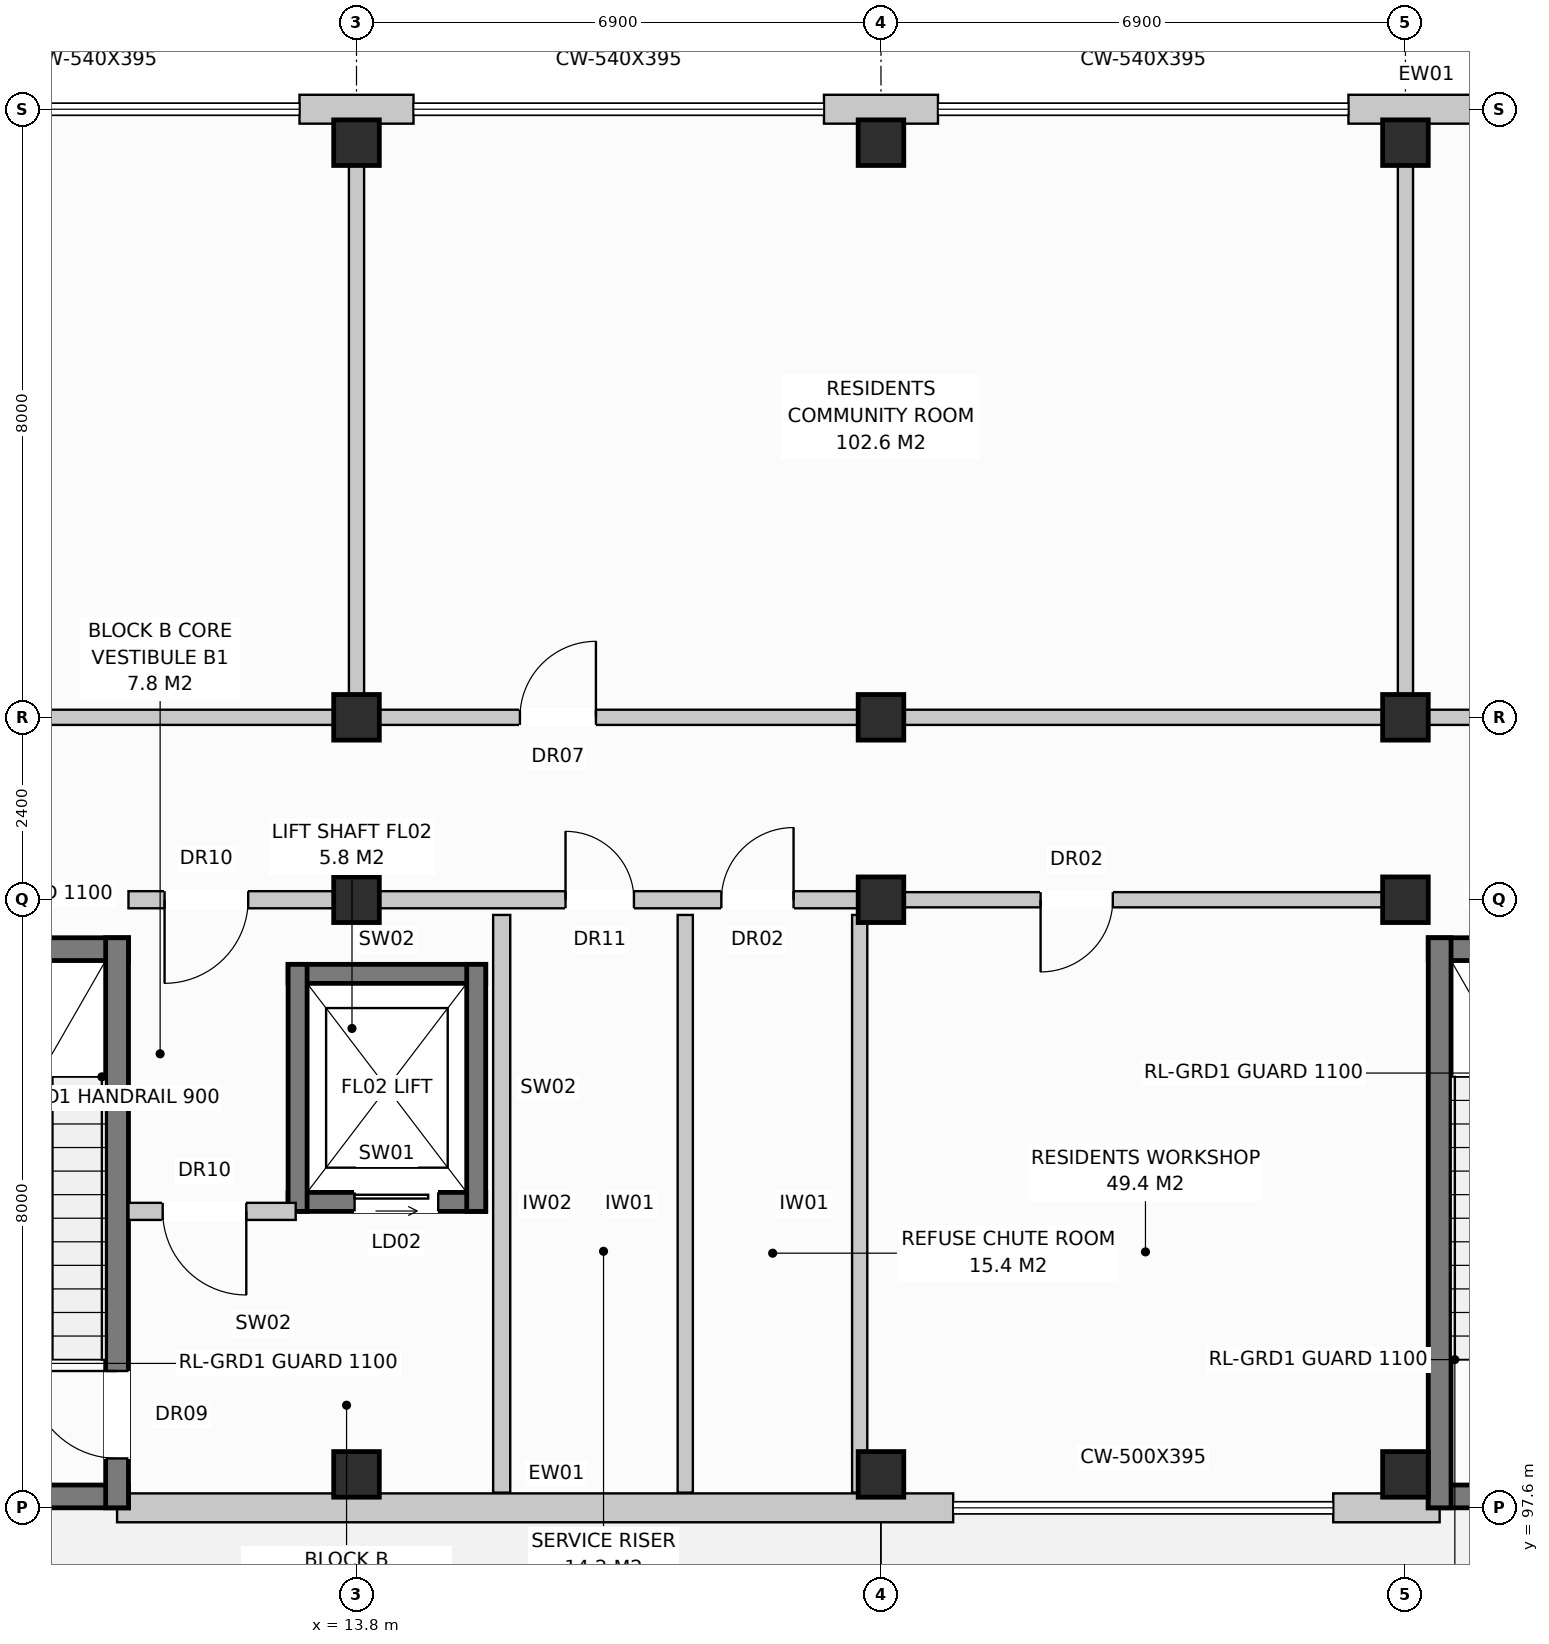
"""IFC4 building model, lengths in metres.
Left out: names, types, materials, properties, quantities, classifications, styles, units other than length and angle.
Written with IfcOpenShell. Run it as: python <this file> out.ifc"""

import sys

from ifc_helpers import new_model, si_unit, direction, frame, frame_2d, origin, origin_with_axes, origin_2d, place, context, subcontext, project, spatial, rectangle, extrude, element, fill, save


model = new_model("IFC4")
c1 = context("Model", 3, precision=1e-05, world=origin(), true_north=direction((0.0, 1.0)))
c2 = subcontext(c1, "Body", "Model", "MODEL_VIEW")
j1 = project(units=[si_unit("LENGTHUNIT", "METRE"), si_unit("PLANEANGLEUNIT", "RADIAN")], contexts=[c1])
p1 = place(None, origin())
s1 = spatial("IfcSite", under=j1, at=p1, CompositionType="ELEMENT")
p2 = place(p1, origin())
s2 = spatial("IfcBuilding", under=s1, at=p2, CompositionType="ELEMENT")
p3 = place(p2, origin())
s3 = spatial("IfcBuildingStorey", under=s2, at=p3, CompositionType="ELEMENT", Elevation=0.0)
for number, where, z_axis, x_axis in (
    (1, (13.8, 98.04, 0.0), (0.0, 0.0, 1.0), (1.0, 0.0, 0.0)),
    (2, (13.8, 105.6, 0.0), (0.0, 0.0, 1.0), (1.0, 0.0, 0.0)),
    (3, (13.8, 108.0, 0.0), (0.0, 0.0, 1.0), (1.0, 0.0, 0.0)),
    (4, (13.8, 115.56, 0.0), (0.0, 0.0, 1.0), (1.0, 0.0, 0.0)),
    (5, (20.7, 98.04, 0.0), (0.0, 0.0, 1.0), (1.0, 0.0, 0.0)),
    (6, (20.7, 105.6, 0.0), (0.0, 0.0, 1.0), (1.0, 0.0, 0.0)),
    (7, (20.7, 108.0, 0.0), (0.0, 0.0, 1.0), (1.0, 0.0, 0.0)),
    (8, (20.7, 115.56, 0.0), (0.0, 0.0, 1.0), (1.0, 0.0, 0.0)),
    (9, (27.6, 98.04, 0.0), (0.0, 0.0, 1.0), (1.0, 0.0, 0.0)),
    (10, (27.6, 105.6, 0.0), (0.0, 0.0, 1.0), (1.0, 0.0, 0.0)),
    (11, (27.6, 108.0, 0.0), (0.0, 0.0, 1.0), (1.0, 0.0, 0.0)),
    (12, (27.6, 115.56, 0.0), (0.0, 0.0, 1.0), (1.0, 0.0, 0.0)),
):
    element("IfcColumn", number, at=place(p3, frame(where, z_axis=z_axis, x_axis=x_axis)), inside=s3, PredefinedType="COLUMN", context=c2, shape_type="SweptSolid", body=[
        extrude(rectangle(XDim=0.6, YDim=0.6, at=origin_2d()), origin(), (0.0, 0.0, 1.0), 4.4),
    ])
p4 = place(p3, frame((10.65, 97.6, 0.0), z_axis=(0.0, 0.0, 1.0), x_axis=(1.0, 0.0, 0.0)))
e13 = element("IfcWall", 13, at=p4, inside=s3, PredefinedType="STANDARD", context=c2, shape_type="SweptSolid", body=[
    extrude(rectangle(XDim=11.0, YDim=0.38, at=frame_2d((5.5, 0.0))), origin(), (0.0, 0.0, 1.0), 4.12),
])
p5 = place(p3, frame((26.65, 97.6, 0.0), z_axis=(0.0, 0.0, 1.0), x_axis=(1.0, 0.0, 0.0)))
e14 = element("IfcWall", 14, at=p5, inside=s3, PredefinedType="STANDARD", context=c2, shape_type="SweptSolid", body=[
    extrude(rectangle(XDim=1.4, YDim=0.38, at=frame_2d((0.7, 0.0))), origin(), (0.0, 0.0, 1.0), 4.12),
])
for number, where, z_axis, x_axis in (
    (15, (13.05, 116.0, 0.0), (0.0, 0.0, 1.0), (1.0, 0.0, 0.0)),
    (16, (19.95, 116.0, 0.0), (0.0, 0.0, 1.0), (1.0, 0.0, 0.0)),
):
    element("IfcWall", number, at=place(p3, frame(where, z_axis=z_axis, x_axis=x_axis)), inside=s3, PredefinedType="STANDARD", context=c2, shape_type="SweptSolid", body=[
        extrude(rectangle(XDim=1.5, YDim=0.38, at=frame_2d((0.75, 0.0))), origin(), (0.0, 0.0, 1.0), 4.12),
    ])
p6 = place(p3, frame((26.85, 116.0, 0.0), z_axis=(0.0, 0.0, 1.0), x_axis=(1.0, 0.0, 0.0)))
e17 = element("IfcWall", 17, at=p6, inside=s3, PredefinedType="STANDARD", context=c2, shape_type="SweptSolid", body=[
    extrude(rectangle(XDim=4.05, YDim=0.38, at=frame_2d((2.025, 0.0))), origin(), (0.0, 0.0, 1.0), 4.12),
])
p7 = place(p6, frame((1.8, 0.0, 0.0)))
e18 = element("IfcOpeningElement", 18, at=p7, cuts=e17, PredefinedType="OPENING", context=c2, shape_type="SweptSolid", body=[
    extrude(rectangle(XDim=2.0, YDim=2.45, at=frame_2d((1.0, 1.225))), frame((0.0, 0.202, 0.0), z_axis=(0.0, -1.0, 0.0), x_axis=(1.0, 0.0, 0.0)), (0.0, 0.0, 1.0), 0.404),
])
p8 = place(p3, frame((7.2, 97.75, 0.0), z_axis=(0.0, 0.0, 1.0), x_axis=(1.0, 0.0, 0.0)))
e19 = element("IfcWall", 19, at=p8, inside=s3, PredefinedType="SHEAR", context=c2, shape_type="SweptSolid", body=[
    extrude(rectangle(XDim=3.6, YDim=0.3, at=frame_2d((1.8, 0.0))), origin(), (0.0, 0.0, 1.0), 4.12),
])
p9 = place(p8, frame((1.1, 0.0, 0.0)))
e20 = element("IfcOpeningElement", 20, at=p9, cuts=e19, PredefinedType="OPENING", context=c2, shape_type="SweptSolid", body=[
    extrude(rectangle(XDim=1.4, YDim=2.25, at=frame_2d((0.7, 1.125))), frame((0.0, 0.162, 0.0), z_axis=(0.0, -1.0, 0.0), x_axis=(1.0, 0.0, 0.0)), (0.0, 0.0, 1.0), 0.324),
])
p10 = place(p3, frame((7.2, 104.95, 0.0), z_axis=(0.0, 0.0, 1.0), x_axis=(1.0, 0.0, 0.0)))
e21 = element("IfcWall", 21, at=p10, inside=s3, PredefinedType="SHEAR", context=c2, shape_type="SweptSolid", body=[
    extrude(rectangle(XDim=3.6, YDim=0.3, at=frame_2d((1.8, 0.0))), origin(), (0.0, 0.0, 1.0), 4.12),
])
p11 = place(p3, frame((10.65, 97.6, 0.0), z_axis=(0.0, 0.0, 1.0), x_axis=(0.0, 1.0, 0.0)))
e22 = element("IfcWall", 22, at=p11, inside=s3, PredefinedType="SHEAR", context=c2, shape_type="SweptSolid", body=[
    extrude(rectangle(XDim=7.5, YDim=0.3, at=frame_2d((3.75, 0.0))), origin(), (0.0, 0.0, 1.0), 4.12),
])
p12 = place(p11, frame((0.65, 0.0, 0.0)))
e23 = element("IfcOpeningElement", 23, at=p12, cuts=e22, PredefinedType="OPENING", context=c2, shape_type="SweptSolid", body=[
    extrude(rectangle(XDim=1.15, YDim=2.15, at=frame_2d((0.575, 1.075))), frame((0.0, 0.162, 0.0), z_axis=(0.0, -1.0, 0.0), x_axis=(1.0, 0.0, 0.0)), (0.0, 0.0, 1.0), 0.324),
])
p13 = place(p3, frame((12.9, 101.625, 0.0), z_axis=(0.0, 0.0, 1.0), x_axis=(1.0, 0.0, 0.0)))
e24 = element("IfcWall", 24, at=p13, inside=s3, PredefinedType="SHEAR", context=c2, shape_type="SweptSolid", body=[
    extrude(rectangle(XDim=2.6, YDim=0.25, at=frame_2d((1.3, 0.0))), origin(), (0.0, 0.0, 1.0), 4.12),
])
p14 = place(p13, frame((0.875, 0.0, 0.0)))
e25 = element("IfcOpeningElement", 25, at=p14, cuts=e24, PredefinedType="OPENING", context=c2, shape_type="SweptSolid", body=[
    extrude(rectangle(XDim=1.1, YDim=2.1, at=frame_2d((0.55, 1.05))), frame((0.0, 0.137, 0.0), z_axis=(0.0, -1.0, 0.0), x_axis=(1.0, 0.0, 0.0)), (0.0, 0.0, 1.0), 0.274),
])
p15 = place(p3, frame((12.9, 104.625, 0.0), z_axis=(0.0, 0.0, 1.0), x_axis=(1.0, 0.0, 0.0)))
e26 = element("IfcWall", 26, at=p15, inside=s3, PredefinedType="SHEAR", context=c2, shape_type="SweptSolid", body=[
    extrude(rectangle(XDim=2.6, YDim=0.25, at=frame_2d((1.3, 0.0))), origin(), (0.0, 0.0, 1.0), 4.12),
])
for number, where, z_axis, x_axis in (
    (27, (13.025, 101.5, 0.0), (0.0, 0.0, 1.0), (0.0, 1.0, 0.0)),
    (28, (15.375, 101.5, 0.0), (0.0, 0.0, 1.0), (0.0, 1.0, 0.0)),
):
    element("IfcWall", number, at=place(p3, frame(where, z_axis=z_axis, x_axis=x_axis)), inside=s3, PredefinedType="SHEAR", context=c2, shape_type="SweptSolid", body=[
        extrude(rectangle(XDim=3.25, YDim=0.25, at=frame_2d((1.625, 0.0))), origin(), (0.0, 0.0, 1.0), 4.12),
    ])
p16 = place(p3, frame((15.71, 97.8, 0.0), z_axis=(0.0, 0.0, 1.0), x_axis=(0.0, 1.0, 0.0)))
e29 = element("IfcWall", 29, at=p16, inside=s3, PredefinedType="PARTITIONING", context=c2, shape_type="SweptSolid", body=[
    extrude(rectangle(XDim=7.6, YDim=0.225, at=frame_2d((3.8, 0.0))), origin(), (0.0, 0.0, 1.0), 3.79),
])
p17 = place(p3, frame((10.8, 101.5, 0.0), z_axis=(0.0, 0.0, 1.0), x_axis=(1.0, 0.0, 0.0)))
e30 = element("IfcWall", 30, at=p17, inside=s3, PredefinedType="PARTITIONING", context=c2, shape_type="SweptSolid", body=[
    extrude(rectangle(XDim=2.2, YDim=0.225, at=frame_2d((1.1, 0.0))), origin(), (0.0, 0.0, 1.0), 4.12),
])
p18 = place(p17, frame((0.45, 0.0, 0.0)))
e31 = element("IfcOpeningElement", 31, at=p18, cuts=e30, PredefinedType="OPENING", context=c2, shape_type="SweptSolid", body=[
    extrude(rectangle(XDim=1.1, YDim=2.15, at=frame_2d((0.55, 1.075))), frame((0.0, 0.125, 0.0), z_axis=(0.0, -1.0, 0.0), x_axis=(1.0, 0.0, 0.0)), (0.0, 0.0, 1.0), 0.249),
])
p19 = place(p3, frame((18.125, 97.8, 0.0), z_axis=(0.0, 0.0, 1.0), x_axis=(0.0, 1.0, 0.0)))
e32 = element("IfcWall", 32, at=p19, inside=s3, PredefinedType="PARTITIONING", context=c2, shape_type="SweptSolid", body=[
    extrude(rectangle(XDim=7.6, YDim=0.2, at=frame_2d((3.8, 0.0))), origin(), (0.0, 0.0, 1.0), 3.79),
])
p20 = place(p3, frame((20.42, 97.8, 0.0), z_axis=(0.0, 0.0, 1.0), x_axis=(0.0, 1.0, 0.0)))
e33 = element("IfcWall", 33, at=p20, inside=s3, PredefinedType="PARTITIONING", context=c2, shape_type="SweptSolid", body=[
    extrude(rectangle(XDim=7.6, YDim=0.2, at=frame_2d((3.8, 0.0))), origin(), (0.0, 0.0, 1.0), 4.12),
])
p21 = place(p3, frame((10.8, 105.6, 0.0), z_axis=(0.0, 0.0, 1.0), x_axis=(1.0, 0.0, 0.0)))
e34 = element("IfcWall", 34, at=p21, inside=s3, PredefinedType="PARTITIONING", context=c2, shape_type="SweptSolid", body=[
    extrude(rectangle(XDim=9.9, YDim=0.225, at=frame_2d((4.95, 0.0))), origin(), (0.0, 0.0, 1.0), 3.56),
])
p22 = place(p21, frame((0.475, 0.0, 0.0)))
e35 = element("IfcOpeningElement", 35, at=p22, cuts=e34, PredefinedType="OPENING", context=c2, shape_type="SweptSolid", body=[
    extrude(rectangle(XDim=1.1, YDim=2.15, at=frame_2d((0.55, 1.075))), frame((0.0, 0.125, 0.0), z_axis=(0.0, -1.0, 0.0), x_axis=(1.0, 0.0, 0.0)), (0.0, 0.0, 1.0), 0.249),
])
p23 = place(p21, frame((5.75, 0.0, 0.0)))
e36 = element("IfcOpeningElement", 36, at=p23, cuts=e34, PredefinedType="OPENING", context=c2, shape_type="SweptSolid", body=[
    extrude(rectangle(XDim=0.9, YDim=2.1, at=frame_2d((0.45, 1.05))), frame((0.0, 0.125, 0.0), z_axis=(0.0, -1.0, 0.0), x_axis=(1.0, 0.0, 0.0)), (0.0, 0.0, 1.0), 0.249),
])
p24 = place(p21, frame((7.8, 0.0, 0.0)))
e37 = element("IfcOpeningElement", 37, at=p24, cuts=e34, PredefinedType="OPENING", context=c2, shape_type="SweptSolid", body=[
    extrude(rectangle(XDim=0.95, YDim=2.15, at=frame_2d((0.475, 1.075))), frame((0.0, 0.125, 0.0), z_axis=(0.0, -1.0, 0.0), x_axis=(1.0, 0.0, 0.0)), (0.0, 0.0, 1.0), 0.249),
])
p25 = place(p3, frame((27.9, 97.75, 0.0), z_axis=(0.0, 0.0, 1.0), x_axis=(1.0, 0.0, 0.0)))
e38 = element("IfcWall", 38, at=p25, inside=s3, PredefinedType="SHEAR", context=c2, shape_type="SweptSolid", body=[
    extrude(rectangle(XDim=3.6, YDim=0.3, at=frame_2d((1.8, 0.0))), origin(), (0.0, 0.0, 1.0), 4.12),
])
p26 = place(p25, frame((1.1, 0.0, 0.0)))
e39 = element("IfcOpeningElement", 39, at=p26, cuts=e38, PredefinedType="OPENING", context=c2, shape_type="SweptSolid", body=[
    extrude(rectangle(XDim=1.4, YDim=2.25, at=frame_2d((0.7, 1.125))), frame((0.0, 0.162, 0.0), z_axis=(0.0, -1.0, 0.0), x_axis=(1.0, 0.0, 0.0)), (0.0, 0.0, 1.0), 0.324),
])
p27 = place(p3, frame((27.9, 104.95, 0.0), z_axis=(0.0, 0.0, 1.0), x_axis=(1.0, 0.0, 0.0)))
e40 = element("IfcWall", 40, at=p27, inside=s3, PredefinedType="SHEAR", context=c2, shape_type="SweptSolid", body=[
    extrude(rectangle(XDim=3.6, YDim=0.3, at=frame_2d((1.8, 0.0))), origin(), (0.0, 0.0, 1.0), 4.12),
])
p28 = place(p3, frame((28.05, 97.6, 0.0), z_axis=(0.0, 0.0, 1.0), x_axis=(0.0, 1.0, 0.0)))
e41 = element("IfcWall", 41, at=p28, inside=s3, PredefinedType="SHEAR", context=c2, shape_type="SweptSolid", body=[
    extrude(rectangle(XDim=7.5, YDim=0.3, at=frame_2d((3.75, 0.0))), origin(), (0.0, 0.0, 1.0), 4.12),
])
p29 = place(p3, frame((27.6, 105.6, 0.0), z_axis=(0.0, 0.0, 1.0), x_axis=(1.0, 0.0, 0.0)))
e42 = element("IfcWall", 42, at=p29, inside=s3, PredefinedType="PARTITIONING", context=c2, shape_type="SweptSolid", body=[
    extrude(rectangle(XDim=0.3, YDim=0.225, at=frame_2d((0.15, 0.0))), origin(), (0.0, 0.0, 1.0), 4.12),
])
p30 = place(p3, frame((0.3, 108.0, 0.0), z_axis=(0.0, 0.0, 1.0), x_axis=(1.0, 0.0, 0.0)))
e43 = element("IfcWall", 43, at=p30, inside=s3, PredefinedType="PARTITIONING", context=c2, shape_type="SweptSolid", body=[
    extrude(rectangle(XDim=13.35, YDim=0.2, at=frame_2d((6.675, 0.0))), origin(), (0.0, 0.0, 1.0), 3.56),
])
p31 = place(p30, frame((2.0, 0.0, 0.0)))
e44 = element("IfcOpeningElement", 44, at=p31, cuts=e43, PredefinedType="OPENING", context=c2, shape_type="SweptSolid", body=[
    extrude(rectangle(XDim=1.0, YDim=2.15, at=frame_2d((0.5, 1.075))), frame((0.0, 0.112, 0.0), z_axis=(0.0, -1.0, 0.0), x_axis=(1.0, 0.0, 0.0)), (0.0, 0.0, 1.0), 0.224),
])
p32 = place(p3, frame((13.8, 108.15, 0.0), z_axis=(0.0, 0.0, 1.0), x_axis=(0.0, 1.0, 0.0)))
e45 = element("IfcWall", 45, at=p32, inside=s3, PredefinedType="PARTITIONING", context=c2, shape_type="SweptSolid", body=[
    extrude(rectangle(XDim=7.6, YDim=0.2, at=frame_2d((3.8, 0.0))), origin(), (0.0, 0.0, 1.0), 4.12),
])
p33 = place(p3, frame((13.95, 108.0, 0.0), z_axis=(0.0, 0.0, 1.0), x_axis=(1.0, 0.0, 0.0)))
e46 = element("IfcWall", 46, at=p33, inside=s3, PredefinedType="PARTITIONING", context=c2, shape_type="SweptSolid", body=[
    extrude(rectangle(XDim=13.5, YDim=0.2, at=frame_2d((6.75, 0.0))), origin(), (0.0, 0.0, 1.0), 3.56),
])
p34 = place(p33, frame((2.0, 0.0, 0.0)))
e47 = element("IfcOpeningElement", 47, at=p34, cuts=e46, PredefinedType="OPENING", context=c2, shape_type="SweptSolid", body=[
    extrude(rectangle(XDim=1.0, YDim=2.15, at=frame_2d((0.5, 1.075))), frame((0.0, 0.112, 0.0), z_axis=(0.0, -1.0, 0.0), x_axis=(1.0, 0.0, 0.0)), (0.0, 0.0, 1.0), 0.224),
])
p35 = place(p3, frame((27.6, 108.15, 0.0), z_axis=(0.0, 0.0, 1.0), x_axis=(0.0, 1.0, 0.0)))
e48 = element("IfcWall", 48, at=p35, inside=s3, PredefinedType="PARTITIONING", context=c2, shape_type="SweptSolid", body=[
    extrude(rectangle(XDim=7.6, YDim=0.2, at=frame_2d((3.8, 0.0))), origin(), (0.0, 0.0, 1.0), 4.12),
])
p36 = place(p3, frame((27.75, 108.0, 0.0), z_axis=(0.0, 0.0, 1.0), x_axis=(1.0, 0.0, 0.0)))
e49 = element("IfcWall", 49, at=p36, inside=s3, PredefinedType="PARTITIONING", context=c2, shape_type="SweptSolid", body=[
    extrude(rectangle(XDim=13.5, YDim=0.2, at=frame_2d((6.75, 0.0))), origin(), (0.0, 0.0, 1.0), 3.56),
])
p37 = place(p36, frame((2.0, 0.0, 0.0)))
e50 = element("IfcOpeningElement", 50, at=p37, cuts=e49, PredefinedType="OPENING", context=c2, shape_type="SweptSolid", body=[
    extrude(rectangle(XDim=1.0, YDim=2.15, at=frame_2d((0.5, 1.075))), frame((0.0, 0.112, 0.0), z_axis=(0.0, -1.0, 0.0), x_axis=(1.0, 0.0, 0.0)), (0.0, 0.0, 1.0), 0.224),
])
p38 = place(p3, frame((20.9, 105.6, 0.0), z_axis=(0.0, 0.0, 1.0), x_axis=(1.0, 0.0, 0.0)))
e51 = element("IfcWall", 51, at=p38, inside=s3, PredefinedType="PARTITIONING", context=c2, shape_type="SweptSolid", body=[
    extrude(rectangle(XDim=6.5, YDim=0.2, at=frame_2d((3.25, 0.0))), origin(), (0.0, 0.0, 1.0), 3.56),
])
p39 = place(p38, frame((1.9, 0.0, 0.0)))
e52 = element("IfcOpeningElement", 52, at=p39, cuts=e51, PredefinedType="OPENING", context=c2, shape_type="SweptSolid", body=[
    extrude(rectangle(XDim=0.95, YDim=2.15, at=frame_2d((0.475, 1.075))), frame((0.0, 0.112, 0.0), z_axis=(0.0, -1.0, 0.0), x_axis=(1.0, 0.0, 0.0)), (0.0, 0.0, 1.0), 0.224),
])
p40 = place(p12, origin_with_axes())
e53 = element("IfcDoor", 53, at=p40, inside=s3, OperationType="SINGLE_SWING_RIGHT", PredefinedType="DOOR", context=c2, shape_type="SweptSolid", body=[
    extrude(rectangle(XDim=1.15, YDim=2.15, at=frame_2d((0.575, 1.075))), frame((0.0, 0.025, 0.0), z_axis=(0.0, -1.0, 0.0), x_axis=(1.0, 0.0, 0.0)), (0.0, 0.0, 1.0), 0.05),
])
fill(e23, e53)
p41 = place(p14, origin_with_axes())
e54 = element("IfcDoor", 54, at=p41, inside=s3, OperationType="SLIDING_TO_LEFT", PredefinedType="DOOR", context=c2, shape_type="SweptSolid", body=[
    extrude(rectangle(XDim=1.1, YDim=2.1, at=frame_2d((0.55, 1.05))), frame((0.0, 0.025, 0.0), z_axis=(0.0, -1.0, 0.0), x_axis=(1.0, 0.0, 0.0)), (0.0, 0.0, 1.0), 0.05),
])
fill(e25, e54)
p42 = place(p18, frame((1.1, 0.0, 0.0), z_axis=(0.0, 0.0, 1.0), x_axis=(-1.0, 0.0, 0.0)))
e55 = element("IfcDoor", 55, at=p42, inside=s3, OperationType="SINGLE_SWING_RIGHT", PredefinedType="DOOR", context=c2, shape_type="SweptSolid", body=[
    extrude(rectangle(XDim=1.1, YDim=2.15, at=frame_2d((0.55, 1.075))), frame((0.0, 0.025, 0.0), z_axis=(0.0, -1.0, 0.0), x_axis=(1.0, 0.0, 0.0)), (0.0, 0.0, 1.0), 0.05),
])
fill(e31, e55)
p43 = place(p22, frame((1.1, 0.0, 0.0), z_axis=(0.0, 0.0, 1.0), x_axis=(-1.0, 0.0, 0.0)))
e56 = element("IfcDoor", 56, at=p43, inside=s3, OperationType="SINGLE_SWING_LEFT", PredefinedType="DOOR", context=c2, shape_type="SweptSolid", body=[
    extrude(rectangle(XDim=1.1, YDim=2.15, at=frame_2d((0.55, 1.075))), frame((0.0, 0.025, 0.0), z_axis=(0.0, -1.0, 0.0), x_axis=(1.0, 0.0, 0.0)), (0.0, 0.0, 1.0), 0.05),
])
fill(e35, e56)
p44 = place(p23, origin_with_axes())
e57 = element("IfcDoor", 57, at=p44, inside=s3, OperationType="SINGLE_SWING_LEFT", PredefinedType="DOOR", context=c2, shape_type="SweptSolid", body=[
    extrude(rectangle(XDim=0.9, YDim=2.1, at=frame_2d((0.45, 1.05))), frame((0.0, 0.025, 0.0), z_axis=(0.0, -1.0, 0.0), x_axis=(1.0, 0.0, 0.0)), (0.0, 0.0, 1.0), 0.05),
])
fill(e36, e57)
p45 = place(p24, origin_with_axes())
e58 = element("IfcDoor", 58, at=p45, inside=s3, OperationType="SINGLE_SWING_RIGHT", PredefinedType="DOOR", context=c2, shape_type="SweptSolid", body=[
    extrude(rectangle(XDim=0.95, YDim=2.15, at=frame_2d((0.475, 1.075))), frame((0.0, 0.025, 0.0), z_axis=(0.0, -1.0, 0.0), x_axis=(1.0, 0.0, 0.0)), (0.0, 0.0, 1.0), 0.05),
])
fill(e37, e58)
p46 = place(p34, origin_with_axes())
e59 = element("IfcDoor", 59, at=p46, inside=s3, OperationType="SINGLE_SWING_RIGHT", PredefinedType="DOOR", context=c2, shape_type="SweptSolid", body=[
    extrude(rectangle(XDim=1.0, YDim=2.15, at=frame_2d((0.5, 1.075))), frame((0.0, 0.025, 0.0), z_axis=(0.0, -1.0, 0.0), x_axis=(1.0, 0.0, 0.0)), (0.0, 0.0, 1.0), 0.05),
])
fill(e47, e59)
p47 = place(p39, frame((0.95, 0.0, 0.0), z_axis=(0.0, 0.0, 1.0), x_axis=(-1.0, 0.0, 0.0)))
e60 = element("IfcDoor", 60, at=p47, inside=s3, OperationType="SINGLE_SWING_LEFT", PredefinedType="DOOR", context=c2, shape_type="SweptSolid", body=[
    extrude(rectangle(XDim=0.95, YDim=2.15, at=frame_2d((0.475, 1.075))), frame((0.0, 0.025, 0.0), z_axis=(0.0, -1.0, 0.0), x_axis=(1.0, 0.0, 0.0)), (0.0, 0.0, 1.0), 0.05),
])
fill(e52, e60)
save(model, sys.argv[1])
